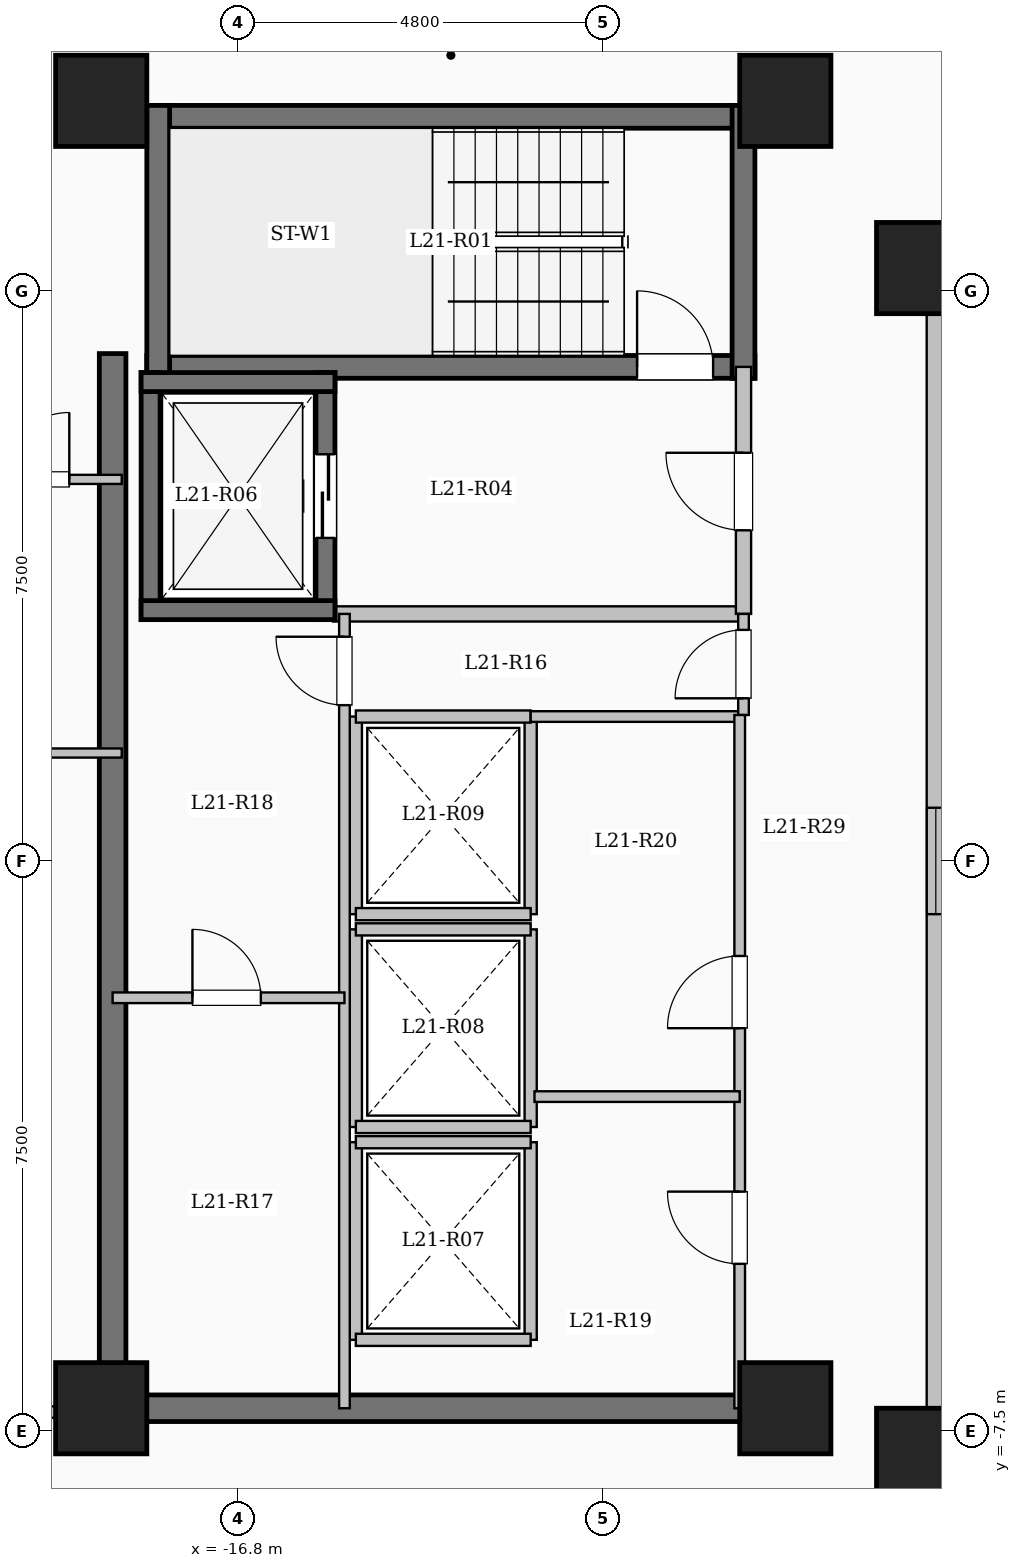
"""IFC4 building model, lengths in metres.
Left out: names, types, materials, properties, quantities, classifications, styles, units other than length and angle.
Written with IfcOpenShell. Run it as: python <this file> out.ifc"""

import sys

from ifc_helpers import new_model, si_unit, direction, frame, frame_2d, origin, origin_2d, place, context, subcontext, project, spatial, rectangle, extrude, element, fill, save


model = new_model("IFC4")
c1 = context("Model", 3, precision=1e-05, world=origin(), true_north=direction((0.0, 1.0)))
c2 = subcontext(c1, "Body", "Model", "MODEL_VIEW")
j1 = project(units=[si_unit("LENGTHUNIT", "METRE"), si_unit("PLANEANGLEUNIT", "RADIAN")], contexts=[c1])
p1 = place(None, origin())
s1 = spatial("IfcSite", under=j1, at=p1, CompositionType="ELEMENT")
p2 = place(p1, origin())
s2 = spatial("IfcBuilding", under=s1, at=p2, CompositionType="ELEMENT")
p3 = place(p2, frame((0.0, 0.0, 81.65)))
s3 = spatial("IfcBuildingStorey", under=s2, at=p3, CompositionType="ELEMENT", Elevation=81.65)
for number, where, z_axis, x_axis in (
    (1, (-7.8, -7.8, 0.0), (0.0, 0.0, 1.0), (1.0, 0.0, 0.0)),
    (2, (-7.8, 7.8, 0.0), (0.0, 0.0, 1.0), (1.0, 0.0, 0.0)),
    (3, (-9.6, -7.2, 0.0), (0.0, 0.0, 1.0), (1.0, 0.0, 0.0)),
    (4, (-9.6, 10.0, 0.0), (0.0, 0.0, 1.0), (1.0, 0.0, 0.0)),
    (5, (-18.6, -7.2, 0.0), (0.0, 0.0, 1.0), (1.0, 0.0, 0.0)),
    (6, (-18.6, 10.0, 0.0), (0.0, 0.0, 1.0), (1.0, 0.0, 0.0)),
):
    element("IfcColumn", number, at=place(p3, frame(where, z_axis=z_axis, x_axis=x_axis)), inside=s3, PredefinedType="COLUMN", context=c2, shape_type="SweptSolid", body=[
        extrude(rectangle(XDim=1.2, YDim=1.2, at=origin_2d()), origin(), (0.0, 0.0, 1.0), 3.35),
    ])
p4 = place(p3, frame((-7.62, -7.62, 0.0), z_axis=(0.0, 0.0, 1.0), x_axis=(1.0, 0.0, 0.0)))
e7 = element("IfcWall", 7, at=p4, inside=s3, PredefinedType="SOLIDWALL", context=c2, shape_type="SweptSolid", body=[
    extrude(rectangle(XDim=15.24, YDim=0.24, at=frame_2d((7.62, 0.0))), origin(), (0.0, 0.0, 1.0), 3.1),
])
p5 = place(p4, frame((6.92, 0.0, 0.95)))
e8 = element("IfcOpeningElement", 8, at=p5, cuts=e7, PredefinedType="OPENING", context=c2, shape_type="SweptSolid", body=[
    extrude(rectangle(XDim=1.4, YDim=1.5, at=frame_2d((0.7, 0.75))), frame((0.0, 0.13, 0.0), z_axis=(0.0, -1.0, 0.0), x_axis=(1.0, 0.0, 0.0)), (0.0, 0.0, 1.0), 0.26),
])
p6 = place(p3, frame((7.62, 7.62, 0.0), z_axis=(0.0, 0.0, 1.0), x_axis=(-1.0, 0.0, 0.0)))
e9 = element("IfcWall", 9, at=p6, inside=s3, PredefinedType="SOLIDWALL", context=c2, shape_type="SweptSolid", body=[
    extrude(rectangle(XDim=15.24, YDim=0.24, at=frame_2d((7.62, 0.0))), origin(), (0.0, 0.0, 1.0), 3.1),
])
p7 = place(p6, frame((6.92, 0.0, 0.95)))
e10 = element("IfcOpeningElement", 10, at=p7, cuts=e9, PredefinedType="OPENING", context=c2, shape_type="SweptSolid", body=[
    extrude(rectangle(XDim=1.4, YDim=1.5, at=frame_2d((0.7, 0.75))), frame((0.0, 0.13, 0.0), z_axis=(0.0, -1.0, 0.0), x_axis=(1.0, 0.0, 0.0)), (0.0, 0.0, 1.0), 0.26),
])
p8 = place(p3, frame((-7.62, 7.62, 0.0), z_axis=(0.0, 0.0, 1.0), x_axis=(0.0, -1.0, 0.0)))
e11 = element("IfcWall", 11, at=p8, inside=s3, PredefinedType="SOLIDWALL", context=c2, shape_type="SweptSolid", body=[
    extrude(rectangle(XDim=15.24, YDim=0.24, at=frame_2d((7.62, 0.0))), origin(), (0.0, 0.0, 1.0), 3.1),
])
p9 = place(p8, frame((6.92, 0.0, 0.95)))
e12 = element("IfcOpeningElement", 12, at=p9, cuts=e11, PredefinedType="OPENING", context=c2, shape_type="SweptSolid", body=[
    extrude(rectangle(XDim=1.4, YDim=1.5, at=frame_2d((0.7, 0.75))), frame((0.0, 0.13, 0.0), z_axis=(0.0, -1.0, 0.0), x_axis=(1.0, 0.0, 0.0)), (0.0, 0.0, 1.0), 0.26),
])
p10 = place(p3, frame((-18.0, 9.79, 0.0), z_axis=(0.0, 0.0, 1.0), x_axis=(1.0, 0.0, 0.0)))
e13 = element("IfcWall", 13, at=p10, inside=s3, PredefinedType="SHEAR", context=c2, shape_type="SweptSolid", body=[
    extrude(rectangle(XDim=8.0, YDim=0.3, at=frame_2d((4.0, 0.0))), origin(), (0.0, 0.0, 1.0), 3.35),
])
p11 = place(p3, frame((-18.0, 6.5, 0.0), z_axis=(0.0, 0.0, 1.0), x_axis=(1.0, 0.0, 0.0)))
e14 = element("IfcWall", 14, at=p11, inside=s3, PredefinedType="SHEAR", context=c2, shape_type="SweptSolid", body=[
    extrude(rectangle(XDim=8.0, YDim=0.3, at=frame_2d((4.0, 0.0))), origin(), (0.0, 0.0, 1.0), 3.35),
])
p12 = place(p11, frame((6.45, 0.0, 0.0)))
e15 = element("IfcOpeningElement", 15, at=p12, cuts=e14, PredefinedType="OPENING", context=c2, shape_type="SweptSolid", body=[
    extrude(rectangle(XDim=1.0, YDim=2.15, at=frame_2d((0.5, 1.075))), frame((0.0, 0.16, 0.0), z_axis=(0.0, -1.0, 0.0), x_axis=(1.0, 0.0, 0.0)), (0.0, 0.0, 1.0), 0.32),
])
for number, where, z_axis, x_axis in (
    (16, (-17.85, 6.35, 0.0), (0.0, 0.0, 1.0), (0.0, 1.0, 0.0)),
    (17, (-10.15, 6.35, 0.0), (0.0, 0.0, 1.0), (0.0, 1.0, 0.0)),
):
    element("IfcWall", number, at=place(p3, frame(where, z_axis=z_axis, x_axis=x_axis)), inside=s3, PredefinedType="SHEAR", context=c2, shape_type="SweptSolid", body=[
        extrude(rectangle(XDim=3.59, YDim=0.3, at=frame_2d((1.795, 0.0))), origin(), (0.0, 0.0, 1.0), 3.35),
    ])
p13 = place(p3, frame((-15.55, 3.25, 0.0), z_axis=(0.0, 0.0, 1.0), x_axis=(1.0, 0.0, 0.0)))
e18 = element("IfcWall", 18, at=p13, inside=s3, PredefinedType="SOLIDWALL", context=c2, shape_type="SweptSolid", body=[
    extrude(rectangle(XDim=5.4, YDim=0.2, at=frame_2d((2.7, 0.0))), origin(), (0.0, 0.0, 1.0), 3.1),
])
p14 = place(p3, frame((-10.15, 3.25, 0.0), z_axis=(0.0, 0.0, 1.0), x_axis=(0.0, 1.0, 0.0)))
e19 = element("IfcWall", 19, at=p14, inside=s3, PredefinedType="SOLIDWALL", context=c2, shape_type="SweptSolid", body=[
    extrude(rectangle(XDim=3.25, YDim=0.2, at=frame_2d((1.625, 0.0))), origin(), (0.0, 0.0, 1.0), 3.1),
])
p15 = place(p14, frame((1.1, 0.0, 0.0)))
e20 = element("IfcOpeningElement", 20, at=p15, cuts=e19, PredefinedType="OPENING", context=c2, shape_type="SweptSolid", body=[
    extrude(rectangle(XDim=1.02, YDim=2.15, at=frame_2d((0.51, 1.075))), frame((0.0, 0.11, 0.0), z_axis=(0.0, -1.0, 0.0), x_axis=(1.0, 0.0, 0.0)), (0.0, 0.0, 1.0), 0.22),
])
p16 = place(p3, frame((-17.95, 3.175, 0.0), z_axis=(0.0, 0.0, 1.0), x_axis=(0.0, 1.0, 0.0)))
e21 = element("IfcWall", 21, at=p16, inside=s3, PredefinedType="SHEAR", context=c2, shape_type="SweptSolid", body=[
    extrude(rectangle(XDim=3.25, YDim=0.25, at=frame_2d((1.625, 0.0))), origin(), (0.0, 0.0, 1.0), 3.35),
])
p17 = place(p3, frame((-15.65, 3.175, 0.0), z_axis=(0.0, 0.0, 1.0), x_axis=(0.0, 1.0, 0.0)))
e22 = element("IfcWall", 22, at=p17, inside=s3, PredefinedType="SHEAR", context=c2, shape_type="SweptSolid", body=[
    extrude(rectangle(XDim=3.25, YDim=0.25, at=frame_2d((1.625, 0.0))), origin(), (0.0, 0.0, 1.0), 3.35),
])
p18 = place(p17, frame((1.075, 0.0, 0.0)))
e23 = element("IfcOpeningElement", 23, at=p18, cuts=e22, PredefinedType="OPENING", context=c2, shape_type="SweptSolid", body=[
    extrude(rectangle(XDim=1.1, YDim=2.15, at=frame_2d((0.55, 1.075))), frame((0.0, 0.135, 0.0), z_axis=(0.0, -1.0, 0.0), x_axis=(1.0, 0.0, 0.0)), (0.0, 0.0, 1.0), 0.27),
])
for number, where, z_axis, x_axis in (
    (24, (-18.075, 3.3, 0.0), (0.0, 0.0, 1.0), (1.0, 0.0, 0.0)),
    (25, (-18.075, 6.3, 0.0), (0.0, 0.0, 1.0), (1.0, 0.0, 0.0)),
):
    element("IfcWall", number, at=place(p3, frame(where, z_axis=z_axis, x_axis=x_axis)), inside=s3, PredefinedType="SHEAR", context=c2, shape_type="SweptSolid", body=[
        extrude(rectangle(XDim=2.55, YDim=0.25, at=frame_2d((1.275, 0.0))), origin(), (0.0, 0.0, 1.0), 3.35),
    ])
for number, where, z_axis, x_axis in (
    (26, (-15.25, -6.3, 0.0), (0.0, 0.0, 1.0), (0.0, 1.0, 0.0)),
    (27, (-12.95, -6.3, 0.0), (0.0, 0.0, 1.0), (0.0, 1.0, 0.0)),
):
    element("IfcWall", number, at=place(p3, frame(where, z_axis=z_axis, x_axis=x_axis)), inside=s3, PredefinedType="SOLIDWALL", context=c2, shape_type="SweptSolid", body=[
        extrude(rectangle(XDim=2.6, YDim=0.16, at=frame_2d((1.3, 0.0))), origin(), (0.0, 0.0, 1.0), 3.1),
    ])
for number, where, z_axis, x_axis in (
    (28, (-15.25, -6.3, 0.0), (0.0, 0.0, 1.0), (1.0, 0.0, 0.0)),
    (29, (-15.25, -3.7, 0.0), (0.0, 0.0, 1.0), (1.0, 0.0, 0.0)),
):
    element("IfcWall", number, at=place(p3, frame(where, z_axis=z_axis, x_axis=x_axis)), inside=s3, PredefinedType="SOLIDWALL", context=c2, shape_type="SweptSolid", body=[
        extrude(rectangle(XDim=2.3, YDim=0.16, at=frame_2d((1.15, 0.0))), origin(), (0.0, 0.0, 1.0), 3.1),
    ])
for number, where, z_axis, x_axis in (
    (30, (-15.25, -3.5, 0.0), (0.0, 0.0, 1.0), (0.0, 1.0, 0.0)),
    (31, (-12.95, -3.5, 0.0), (0.0, 0.0, 1.0), (0.0, 1.0, 0.0)),
):
    element("IfcWall", number, at=place(p3, frame(where, z_axis=z_axis, x_axis=x_axis)), inside=s3, PredefinedType="SOLIDWALL", context=c2, shape_type="SweptSolid", body=[
        extrude(rectangle(XDim=2.6, YDim=0.16, at=frame_2d((1.3, 0.0))), origin(), (0.0, 0.0, 1.0), 3.1),
    ])
for number, where, z_axis, x_axis in (
    (32, (-15.25, -3.5, 0.0), (0.0, 0.0, 1.0), (1.0, 0.0, 0.0)),
    (33, (-15.25, -0.9, 0.0), (0.0, 0.0, 1.0), (1.0, 0.0, 0.0)),
):
    element("IfcWall", number, at=place(p3, frame(where, z_axis=z_axis, x_axis=x_axis)), inside=s3, PredefinedType="SOLIDWALL", context=c2, shape_type="SweptSolid", body=[
        extrude(rectangle(XDim=2.3, YDim=0.16, at=frame_2d((1.15, 0.0))), origin(), (0.0, 0.0, 1.0), 3.1),
    ])
for number, where, z_axis, x_axis in (
    (34, (-15.25, -0.7, 0.0), (0.0, 0.0, 1.0), (0.0, 1.0, 0.0)),
    (35, (-12.95, -0.7, 0.0), (0.0, 0.0, 1.0), (0.0, 1.0, 0.0)),
):
    element("IfcWall", number, at=place(p3, frame(where, z_axis=z_axis, x_axis=x_axis)), inside=s3, PredefinedType="SOLIDWALL", context=c2, shape_type="SweptSolid", body=[
        extrude(rectangle(XDim=2.6, YDim=0.16, at=frame_2d((1.3, 0.0))), origin(), (0.0, 0.0, 1.0), 3.1),
    ])
for number, where, z_axis, x_axis in (
    (36, (-15.25, -0.7, 0.0), (0.0, 0.0, 1.0), (1.0, 0.0, 0.0)),
    (37, (-15.25, 1.9, 0.0), (0.0, 0.0, 1.0), (1.0, 0.0, 0.0)),
):
    element("IfcWall", number, at=place(p3, frame(where, z_axis=z_axis, x_axis=x_axis)), inside=s3, PredefinedType="SOLIDWALL", context=c2, shape_type="SweptSolid", body=[
        extrude(rectangle(XDim=2.3, YDim=0.16, at=frame_2d((1.15, 0.0))), origin(), (0.0, 0.0, 1.0), 3.1),
    ])
p19 = place(p3, frame((-18.45, -7.375, 0.0), z_axis=(0.0, 0.0, 1.0), x_axis=(0.0, 1.0, 0.0)))
e38 = element("IfcWall", 38, at=p19, inside=s3, PredefinedType="SHEAR", context=c2, shape_type="SweptSolid", body=[
    extrude(rectangle(XDim=14.05, YDim=0.35, at=frame_2d((7.025, 0.0))), origin(), (0.0, 0.0, 1.0), 3.35),
])
p20 = place(p3, frame((-18.625, -7.2, 0.0), z_axis=(0.0, 0.0, 1.0), x_axis=(1.0, 0.0, 0.0)))
e39 = element("IfcWall", 39, at=p20, inside=s3, PredefinedType="SHEAR", context=c2, shape_type="SweptSolid", body=[
    extrude(rectangle(XDim=8.55, YDim=0.35, at=frame_2d((4.275, 0.0))), origin(), (0.0, 0.0, 1.0), 3.35),
])
p21 = place(p3, frame((-12.95, 1.9, 0.0), z_axis=(0.0, 0.0, 1.0), x_axis=(1.0, 0.0, 0.0)))
e40 = element("IfcWall", 40, at=p21, inside=s3, PredefinedType="PARTITIONING", context=c2, shape_type="SweptSolid", body=[
    extrude(rectangle(XDim=2.8, YDim=0.14, at=frame_2d((1.4, 0.0))), origin(), (0.0, 0.0, 1.0), 3.1),
])
p22 = place(p3, frame((-10.15, 1.92, 0.0), z_axis=(0.0, 0.0, 1.0), x_axis=(0.0, 1.0, 0.0)))
e41 = element("IfcWall", 41, at=p22, inside=s3, PredefinedType="PARTITIONING", context=c2, shape_type="SweptSolid", body=[
    extrude(rectangle(XDim=1.33, YDim=0.14, at=frame_2d((0.665, 0.0))), origin(), (0.0, 0.0, 1.0), 3.1),
])
p23 = place(p22, frame((0.22, 0.0, 0.0)))
e42 = element("IfcOpeningElement", 42, at=p23, cuts=e41, PredefinedType="OPENING", context=c2, shape_type="SweptSolid", body=[
    extrude(rectangle(XDim=0.9, YDim=2.08, at=frame_2d((0.45, 1.04))), frame((0.0, 0.08, 0.0), z_axis=(0.0, -1.0, 0.0), x_axis=(1.0, 0.0, 0.0)), (0.0, 0.0, 1.0), 0.16),
])
p24 = place(p3, frame((-15.4, -7.2, 0.0), z_axis=(0.0, 0.0, 1.0), x_axis=(0.0, 1.0, 0.0)))
e43 = element("IfcWall", 43, at=p24, inside=s3, PredefinedType="PARTITIONING", context=c2, shape_type="SweptSolid", body=[
    extrude(rectangle(XDim=10.45, YDim=0.14, at=frame_2d((5.225, 0.0))), origin(), (0.0, 0.0, 1.0), 3.1),
])
p25 = place(p24, frame((9.25, 0.0, 0.0)))
e44 = element("IfcOpeningElement", 44, at=p25, cuts=e43, PredefinedType="OPENING", context=c2, shape_type="SweptSolid", body=[
    extrude(rectangle(XDim=0.9, YDim=2.08, at=frame_2d((0.45, 1.04))), frame((0.0, 0.08, 0.0), z_axis=(0.0, -1.0, 0.0), x_axis=(1.0, 0.0, 0.0)), (0.0, 0.0, 1.0), 0.16),
])
p26 = place(p3, frame((-18.45, -1.8, 0.0), z_axis=(0.0, 0.0, 1.0), x_axis=(1.0, 0.0, 0.0)))
e45 = element("IfcWall", 45, at=p26, inside=s3, PredefinedType="PARTITIONING", context=c2, shape_type="SweptSolid", body=[
    extrude(rectangle(XDim=3.05, YDim=0.14, at=frame_2d((1.525, 0.0))), origin(), (0.0, 0.0, 1.0), 3.1),
])
p27 = place(p26, frame((1.05, 0.0, 0.0)))
e46 = element("IfcOpeningElement", 46, at=p27, cuts=e45, PredefinedType="OPENING", context=c2, shape_type="SweptSolid", body=[
    extrude(rectangle(XDim=0.9, YDim=2.08, at=frame_2d((0.45, 1.04))), frame((0.0, 0.08, 0.0), z_axis=(0.0, -1.0, 0.0), x_axis=(1.0, 0.0, 0.0)), (0.0, 0.0, 1.0), 0.16),
])
p28 = place(p3, frame((-10.2, -7.2, 0.0), z_axis=(0.0, 0.0, 1.0), x_axis=(0.0, 1.0, 0.0)))
e47 = element("IfcWall", 47, at=p28, inside=s3, PredefinedType="PARTITIONING", context=c2, shape_type="SweptSolid", body=[
    extrude(rectangle(XDim=9.12, YDim=0.14, at=frame_2d((4.56, 0.0))), origin(), (0.0, 0.0, 1.0), 3.1),
])
p29 = place(p28, frame((1.9, 0.0, 0.0)))
e48 = element("IfcOpeningElement", 48, at=p29, cuts=e47, PredefinedType="OPENING", context=c2, shape_type="SweptSolid", body=[
    extrude(rectangle(XDim=0.95, YDim=2.12, at=frame_2d((0.475, 1.06))), frame((0.0, 0.08, 0.0), z_axis=(0.0, -1.0, 0.0), x_axis=(1.0, 0.0, 0.0)), (0.0, 0.0, 1.0), 0.16),
])
p30 = place(p28, frame((5.0, 0.0, 0.0)))
e49 = element("IfcOpeningElement", 49, at=p30, cuts=e47, PredefinedType="OPENING", context=c2, shape_type="SweptSolid", body=[
    extrude(rectangle(XDim=0.95, YDim=2.12, at=frame_2d((0.475, 1.06))), frame((0.0, 0.08, 0.0), z_axis=(0.0, -1.0, 0.0), x_axis=(1.0, 0.0, 0.0)), (0.0, 0.0, 1.0), 0.16),
])
p31 = place(p3, frame((-12.9, -3.1, 0.0), z_axis=(0.0, 0.0, 1.0), x_axis=(1.0, 0.0, 0.0)))
e50 = element("IfcWall", 50, at=p31, inside=s3, PredefinedType="PARTITIONING", context=c2, shape_type="SweptSolid", body=[
    extrude(rectangle(XDim=2.7, YDim=0.14, at=frame_2d((1.35, 0.0))), origin(), (0.0, 0.0, 1.0), 3.1),
])
p32 = place(p3, frame((-26.88, -7.25, 0.0), z_axis=(0.0, 0.0, 1.0), x_axis=(1.0, 0.0, 0.0)))
e51 = element("IfcWall", 51, at=p32, inside=s3, PredefinedType="PARTITIONING", context=c2, shape_type="SweptSolid", body=[
    extrude(rectangle(XDim=8.43, YDim=0.15, at=frame_2d((4.215, 0.0))), origin(), (0.0, 0.0, 1.0), 3.1),
])
p33 = place(p32, frame((5.33, 0.0, 0.0)))
e52 = element("IfcOpeningElement", 52, at=p33, cuts=e51, PredefinedType="OPENING", context=c2, shape_type="SweptSolid", body=[
    extrude(rectangle(XDim=0.96, YDim=2.15, at=frame_2d((0.48, 1.075))), frame((0.0, 0.085, 0.0), z_axis=(0.0, -1.0, 0.0), x_axis=(1.0, 0.0, 0.0)), (0.0, 0.0, 1.0), 0.17),
])
p34 = place(p3, frame((-27.0, 1.42, 0.0), z_axis=(0.0, 0.0, 1.0), x_axis=(1.0, 0.0, 0.0)))
e53 = element("IfcWall", 53, at=p34, inside=s3, PredefinedType="PARTITIONING", context=c2, shape_type="SweptSolid", body=[
    extrude(rectangle(XDim=8.67, YDim=0.12, at=frame_2d((4.335, 0.0))), origin(), (0.0, 0.0, 1.0), 3.1),
])
p35 = place(p34, frame((1.763, 0.0, 0.0)))
e54 = element("IfcOpeningElement", 54, at=p35, cuts=e53, PredefinedType="OPENING", context=c2, shape_type="SweptSolid", body=[
    extrude(rectangle(XDim=0.88, YDim=2.1, at=frame_2d((0.44, 1.05))), frame((0.0, 0.07, 0.0), z_axis=(0.0, -1.0, 0.0), x_axis=(1.0, 0.0, 0.0)), (0.0, 0.0, 1.0), 0.14),
])
p36 = place(p34, frame((5.928, 0.0, 0.0)))
e55 = element("IfcOpeningElement", 55, at=p36, cuts=e53, PredefinedType="OPENING", context=c2, shape_type="SweptSolid", body=[
    extrude(rectangle(XDim=0.88, YDim=2.1, at=frame_2d((0.44, 1.05))), frame((0.0, 0.07, 0.0), z_axis=(0.0, -1.0, 0.0), x_axis=(1.0, 0.0, 0.0)), (0.0, 0.0, 1.0), 0.14),
])
p37 = place(p3, frame((-27.0, 5.02, 0.0), z_axis=(0.0, 0.0, 1.0), x_axis=(1.0, 0.0, 0.0)))
e56 = element("IfcWall", 56, at=p37, inside=s3, PredefinedType="PARTITIONING", context=c2, shape_type="SweptSolid", body=[
    extrude(rectangle(XDim=8.67, YDim=0.12, at=frame_2d((4.335, 0.0))), origin(), (0.0, 0.0, 1.0), 3.1),
])
p38 = place(p37, frame((7.1, 0.0, 0.0)))
e57 = element("IfcOpeningElement", 57, at=p38, cuts=e56, PredefinedType="OPENING", context=c2, shape_type="SweptSolid", body=[
    extrude(rectangle(XDim=0.88, YDim=2.1, at=frame_2d((0.44, 1.05))), frame((0.0, 0.07, 0.0), z_axis=(0.0, -1.0, 0.0), x_axis=(1.0, 0.0, 0.0)), (0.0, 0.0, 1.0), 0.14),
])
p39 = place(p9, origin())
e58 = element("IfcWindow", 58, at=p39, inside=s3, PartitioningType="SINGLE_PANEL", PredefinedType="WINDOW", context=c2, shape_type="SweptSolid", body=[
    extrude(rectangle(XDim=1.4, YDim=1.5, at=frame_2d((0.7, 0.75))), frame((0.0, 0.03, 0.0), z_axis=(0.0, -1.0, 0.0), x_axis=(1.0, 0.0, 0.0)), (0.0, 0.0, 1.0), 0.06),
])
fill(e12, e58)
p40 = place(p12, origin())
e59 = element("IfcDoor", 59, at=p40, inside=s3, OperationType="SINGLE_SWING_LEFT", PredefinedType="DOOR", context=c2, shape_type="SweptSolid", body=[
    extrude(rectangle(XDim=1.0, YDim=2.15, at=frame_2d((0.5, 1.075))), frame((0.0, 0.025, 0.0), z_axis=(0.0, -1.0, 0.0), x_axis=(1.0, 0.0, 0.0)), (0.0, 0.0, 1.0), 0.05),
])
fill(e15, e59)
p41 = place(p15, origin())
e60 = element("IfcDoor", 60, at=p41, inside=s3, OperationType="SINGLE_SWING_RIGHT", PredefinedType="DOOR", context=c2, shape_type="SweptSolid", body=[
    extrude(rectangle(XDim=1.02, YDim=2.15, at=frame_2d((0.51, 1.075))), frame((0.0, 0.025, 0.0), z_axis=(0.0, -1.0, 0.0), x_axis=(1.0, 0.0, 0.0)), (0.0, 0.0, 1.0), 0.05),
])
fill(e20, e60)
p42 = place(p18, origin())
e61 = element("IfcDoor", 61, at=p42, inside=s3, OperationType="SLIDING_TO_LEFT", PredefinedType="DOOR", context=c2, shape_type="SweptSolid", body=[
    extrude(rectangle(XDim=1.1, YDim=2.15, at=frame_2d((0.55, 1.075))), frame((0.0, 0.025, 0.0), z_axis=(0.0, -1.0, 0.0), x_axis=(1.0, 0.0, 0.0)), (0.0, 0.0, 1.0), 0.05),
])
fill(e23, e61)
p43 = place(p23, origin())
e62 = element("IfcDoor", 62, at=p43, inside=s3, OperationType="SINGLE_SWING_LEFT", PredefinedType="DOOR", context=c2, shape_type="SweptSolid", body=[
    extrude(rectangle(XDim=0.9, YDim=2.08, at=frame_2d((0.45, 1.04))), frame((0.0, 0.025, 0.0), z_axis=(0.0, -1.0, 0.0), x_axis=(1.0, 0.0, 0.0)), (0.0, 0.0, 1.0), 0.05),
])
fill(e42, e62)
p44 = place(p25, origin())
e63 = element("IfcDoor", 63, at=p44, inside=s3, OperationType="SINGLE_SWING_RIGHT", PredefinedType="DOOR", context=c2, shape_type="SweptSolid", body=[
    extrude(rectangle(XDim=0.9, YDim=2.08, at=frame_2d((0.45, 1.04))), frame((0.0, 0.025, 0.0), z_axis=(0.0, -1.0, 0.0), x_axis=(1.0, 0.0, 0.0)), (0.0, 0.0, 1.0), 0.05),
])
fill(e44, e63)
p45 = place(p27, origin())
e64 = element("IfcDoor", 64, at=p45, inside=s3, OperationType="SINGLE_SWING_LEFT", PredefinedType="DOOR", context=c2, shape_type="SweptSolid", body=[
    extrude(rectangle(XDim=0.9, YDim=2.08, at=frame_2d((0.45, 1.04))), frame((0.0, 0.025, 0.0), z_axis=(0.0, -1.0, 0.0), x_axis=(1.0, 0.0, 0.0)), (0.0, 0.0, 1.0), 0.05),
])
fill(e46, e64)
p46 = place(p29, origin())
e65 = element("IfcDoor", 65, at=p46, inside=s3, OperationType="SINGLE_SWING_RIGHT", PredefinedType="DOOR", context=c2, shape_type="SweptSolid", body=[
    extrude(rectangle(XDim=0.95, YDim=2.12, at=frame_2d((0.475, 1.06))), frame((0.0, 0.025, 0.0), z_axis=(0.0, -1.0, 0.0), x_axis=(1.0, 0.0, 0.0)), (0.0, 0.0, 1.0), 0.05),
])
fill(e48, e65)
p47 = place(p30, origin())
e66 = element("IfcDoor", 66, at=p47, inside=s3, OperationType="SINGLE_SWING_LEFT", PredefinedType="DOOR", context=c2, shape_type="SweptSolid", body=[
    extrude(rectangle(XDim=0.95, YDim=2.12, at=frame_2d((0.475, 1.06))), frame((0.0, 0.025, 0.0), z_axis=(0.0, -1.0, 0.0), x_axis=(1.0, 0.0, 0.0)), (0.0, 0.0, 1.0), 0.05),
])
fill(e49, e66)
p48 = place(p38, origin())
e67 = element("IfcDoor", 67, at=p48, inside=s3, OperationType="SINGLE_SWING_RIGHT", PredefinedType="DOOR", context=c2, shape_type="SweptSolid", body=[
    extrude(rectangle(XDim=0.88, YDim=2.1, at=frame_2d((0.44, 1.05))), frame((0.0, 0.025, 0.0), z_axis=(0.0, -1.0, 0.0), x_axis=(1.0, 0.0, 0.0)), (0.0, 0.0, 1.0), 0.05),
])
fill(e57, e67)
save(model, sys.argv[1])
